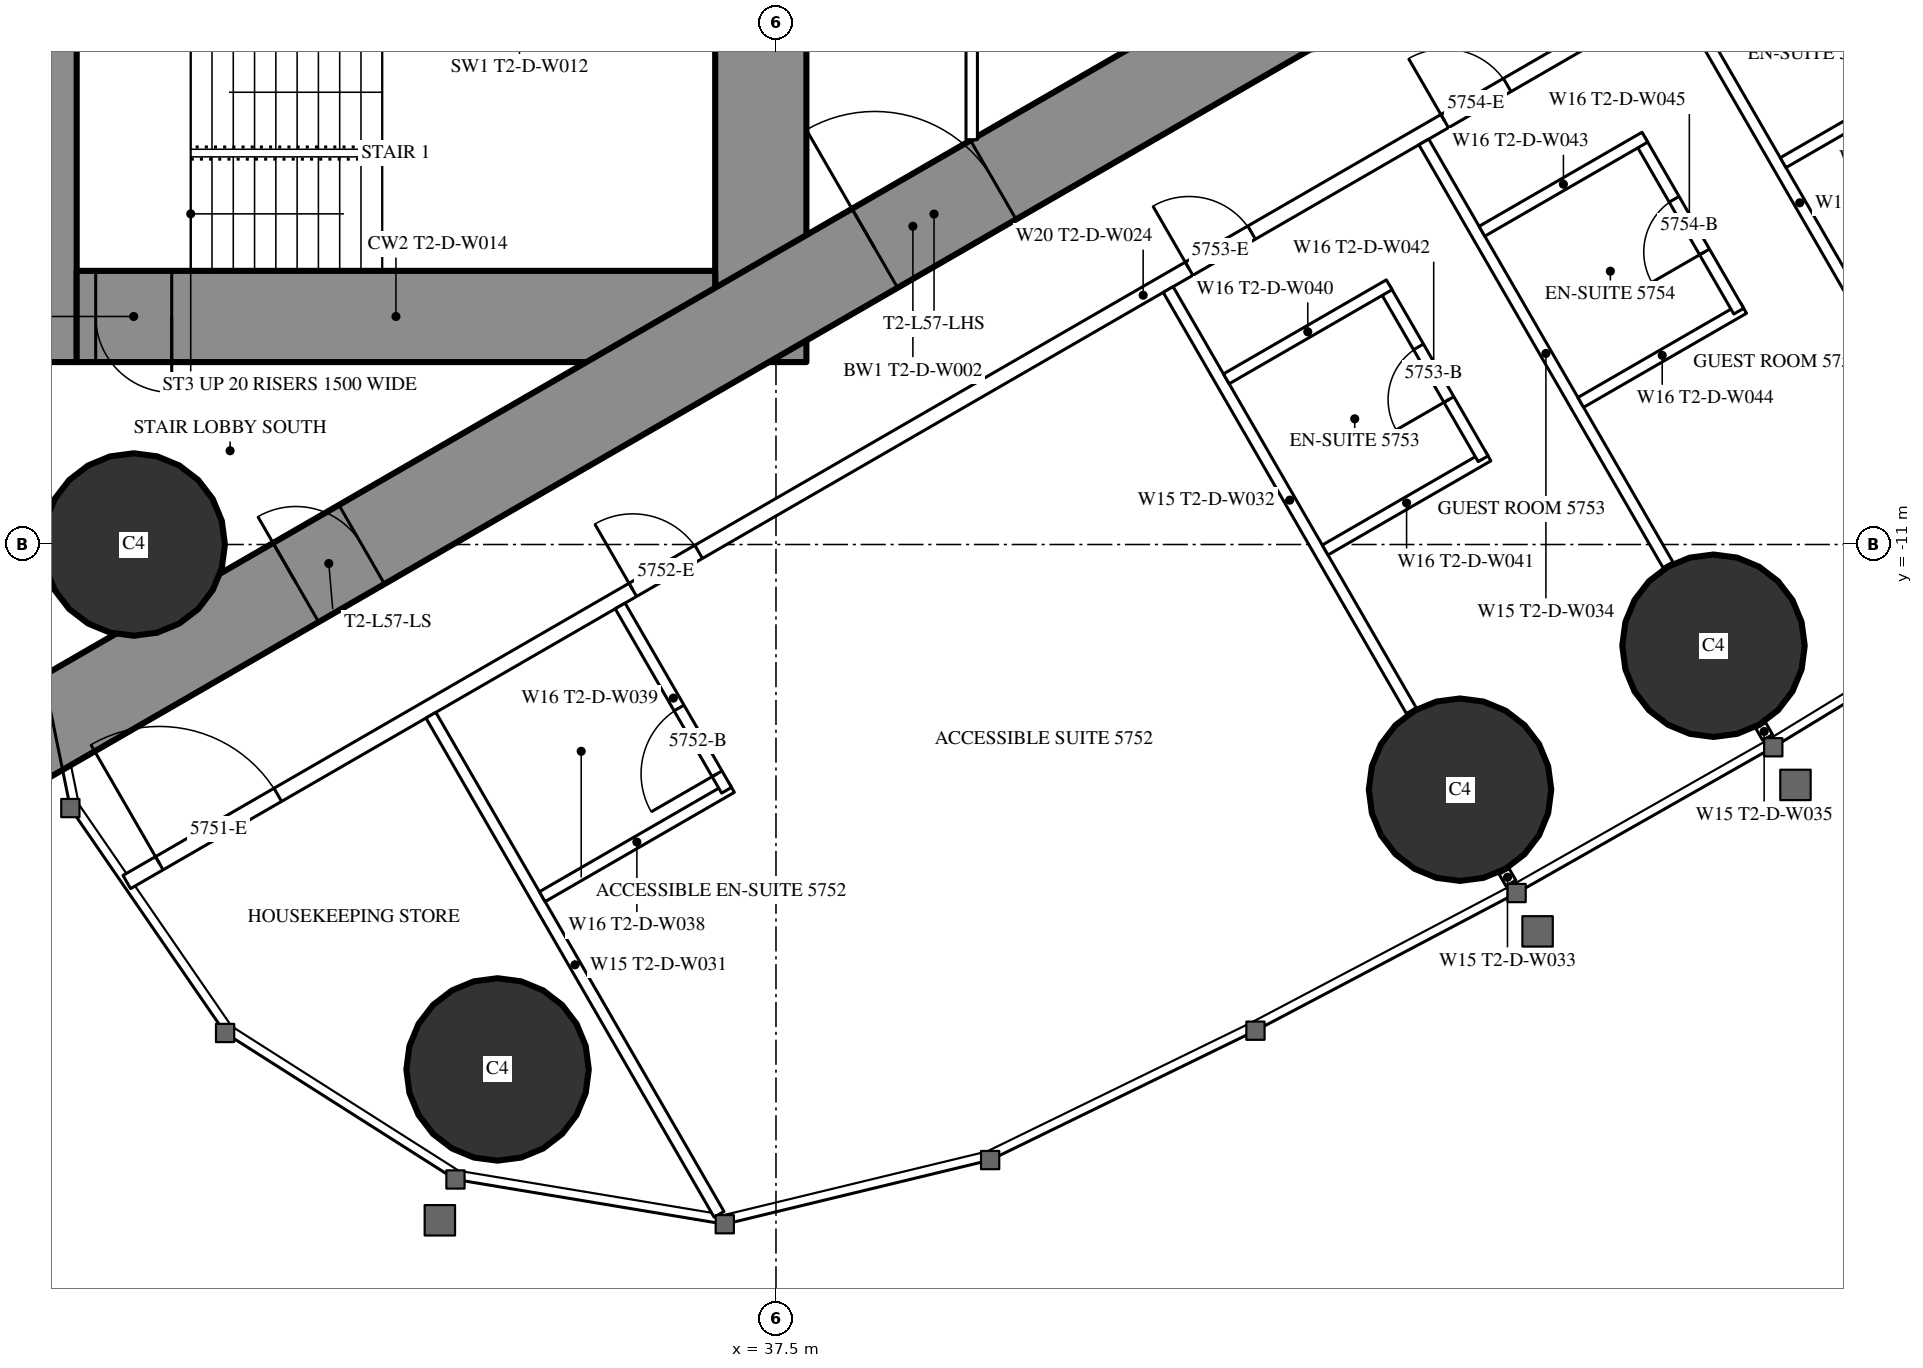
"""IFC4 building model, lengths in metres.
Left out: names, types, materials, properties, quantities, classifications, styles, units other than length and angle.
Written with IfcOpenShell. Run it as: python <this file> out.ifc"""

import sys

from ifc_helpers import new_model, si_unit, direction, frame, frame_2d, origin, origin_2d, place, context, subcontext, project, spatial, rectangle, circle, extrude, element, fill, save


model = new_model("IFC4")
c1 = context("Model", 3, precision=1e-05, world=origin(), true_north=direction((0.0, 1.0)))
c2 = subcontext(c1, "Body", "Model", "MODEL_VIEW")
j1 = project(units=[si_unit("LENGTHUNIT", "METRE"), si_unit("PLANEANGLEUNIT", "RADIAN")], contexts=[c1])
p1 = place(None, origin())
s1 = spatial("IfcSite", under=j1, at=p1, CompositionType="ELEMENT")
p2 = place(p1, origin())
s2 = spatial("IfcBuilding", under=s1, at=p2, CompositionType="ELEMENT")
p3 = place(p2, frame((0.0, 0.0, 215.3)))
s3 = spatial("IfcBuildingStorey", under=s2, at=p3, CompositionType="ELEMENT", Elevation=215.3)
for number, where, z_axis, x_axis in (
    (1, (33.837, -17.906, 0.0), (0.0, 0.0, 1.0), (1.0, 0.0, 0.0)),
    (2, (29.05, -11.0, 0.0), (0.0, 0.0, 1.0), (1.0, 0.0, 0.0)),
    (3, (46.499, -14.226, 0.0), (0.0, 0.0, 1.0), (1.0, 0.0, 0.0)),
    (4, (49.834, -12.332, 0.0), (0.0, 0.0, 1.0), (1.0, 0.0, 0.0)),
):
    element("IfcColumn", number, at=place(p3, frame(where, z_axis=z_axis, x_axis=x_axis)), inside=s3, PredefinedType="COLUMN", context=c2, shape_type="SweptSolid", body=[
        extrude(circle(Radius=1.2, at=origin_2d()), origin(), (0.0, 0.0, 1.0), 3.6),
    ])
p4 = place(p3, frame((27.9, -8.6, 0.0), z_axis=(0.0, 0.0, 1.0), x_axis=(0.0, 1.0, 0.0)))
e5 = element("IfcWall", 5, at=p4, inside=s3, PredefinedType="SHEAR", context=c2, shape_type="SweptSolid", body=[
    extrude(rectangle(XDim=17.2, YDim=0.8, at=frame_2d((8.6, 0.0))), origin(), (0.0, 0.0, 1.0), 3.6),
])
p5 = place(p4, frame((9.35, 0.0, 0.0)))
e6 = element("IfcOpeningElement", 6, at=p5, cuts=e5, PredefinedType="OPENING", context=c2, shape_type="SweptSolid", body=[
    extrude(rectangle(XDim=0.9, YDim=2.2, at=frame_2d((0.45, 1.1))), frame((0.0, 0.41, 0.0), z_axis=(0.0, -1.0, 0.0), x_axis=(1.0, 0.0, 0.0)), (0.0, 0.0, 1.0), 0.82),
])
p6 = place(p3, frame((37.3, -8.6, 0.0), z_axis=(0.0, 0.0, 1.0), x_axis=(0.0, 1.0, 0.0)))
e7 = element("IfcWall", 7, at=p6, inside=s3, PredefinedType="SHEAR", context=c2, shape_type="SweptSolid", body=[
    extrude(rectangle(XDim=17.2, YDim=1.2, at=frame_2d((8.6, 0.0))), origin(), (0.0, 0.0, 1.0), 3.6),
])
p7 = place(p6, frame((7.7, 0.0, 0.0)))
e8 = element("IfcOpeningElement", 8, at=p7, cuts=e7, PredefinedType="OPENING", context=c2, shape_type="SweptSolid", body=[
    extrude(rectangle(XDim=1.8, YDim=2.2, at=frame_2d((0.9, 1.1))), frame((0.0, 0.61, 0.0), z_axis=(0.0, -1.0, 0.0), x_axis=(1.0, 0.0, 0.0)), (0.0, 0.0, 1.0), 1.22),
])
p8 = place(p3, frame((28.3, -8.0, 0.0), z_axis=(0.0, 0.0, 1.0), x_axis=(1.0, 0.0, 0.0)))
e9 = element("IfcWall", 9, at=p8, inside=s3, PredefinedType="SHEAR", context=c2, shape_type="SweptSolid", body=[
    extrude(rectangle(XDim=8.4, YDim=1.2, at=frame_2d((4.2, 0.0))), origin(), (0.0, 0.0, 1.0), 3.6),
])
p9 = place(p8, frame((0.25, 0.0, 0.0)))
e10 = element("IfcOpeningElement", 10, at=p9, cuts=e9, PredefinedType="OPENING", context=c2, shape_type="SweptSolid", body=[
    extrude(rectangle(XDim=1.0, YDim=2.2, at=frame_2d((0.5, 1.1))), frame((0.0, 0.61, 0.0), z_axis=(0.0, -1.0, 0.0), x_axis=(1.0, 0.0, 0.0)), (0.0, 0.0, 1.0), 1.22),
])
p10 = place(p3, frame((27.2, -13.8, 0.0), z_axis=(0.0, 0.0, 1.0), x_axis=(0.866027159892, 0.499996958321, 0.0)))
e11 = element("IfcWall", 11, at=p10, inside=s3, PredefinedType="SHEAR", context=c2, shape_type="SweptSolid", body=[
    extrude(rectangle(XDim=27.947, YDim=1.2, at=frame_2d((13.973, 0.0))), origin(), (0.0, 0.0, 1.0), 3.6),
])
p11 = place(p10, frame((4.6, 0.0, 0.0)))
e12 = element("IfcOpeningElement", 12, at=p11, cuts=e11, PredefinedType="OPENING", context=c2, shape_type="SweptSolid", body=[
    extrude(rectangle(XDim=1.0, YDim=2.2, at=frame_2d((0.5, 1.1))), frame((0.0, 0.61, 0.0), z_axis=(0.0, -1.0, 0.0), x_axis=(1.0, 0.0, 0.0)), (0.0, 0.0, 1.0), 1.22),
])
p12 = place(p10, frame((13.395, 0.0, 0.0)))
e13 = element("IfcOpeningElement", 13, at=p12, cuts=e11, PredefinedType="OPENING", context=c2, shape_type="SweptSolid", body=[
    extrude(rectangle(XDim=1.8, YDim=2.2, at=frame_2d((0.9, 1.1))), frame((0.0, 0.61, 0.0), z_axis=(0.0, -1.0, 0.0), x_axis=(1.0, 0.0, 0.0)), (0.0, 0.0, 1.0), 1.22),
])
p13 = place(p3, frame((28.959, -15.44, 0.0), z_axis=(0.0, 0.0, 1.0), x_axis=(0.866025227435, 0.500000305447, 0.0)))
e14 = element("IfcWall", 14, at=p13, inside=s3, PredefinedType="PARTITIONING", context=c2, shape_type="SweptSolid", body=[
    extrude(rectangle(XDim=30.88, YDim=0.2, at=frame_2d((15.44, 0.0))), origin(), (0.0, 0.0, 1.0), 3.35),
])
p14 = place(p13, frame((0.494, 0.0, 0.0)))
e15 = element("IfcOpeningElement", 15, at=p14, cuts=e14, PredefinedType="OPENING", context=c2, shape_type="SweptSolid", body=[
    extrude(rectangle(XDim=1.8, YDim=2.2, at=frame_2d((0.9, 1.1))), frame((0.0, 0.11, 0.0), z_axis=(0.0, -1.0, 0.0), x_axis=(1.0, 0.0, 0.0)), (0.0, 0.0, 1.0), 0.22),
])
p15 = place(p13, frame((7.687, 0.0, 0.0)))
e16 = element("IfcOpeningElement", 16, at=p15, cuts=e14, PredefinedType="OPENING", context=c2, shape_type="SweptSolid", body=[
    extrude(rectangle(XDim=1.0, YDim=2.2, at=frame_2d((0.5, 1.1))), frame((0.0, 0.11, 0.0), z_axis=(0.0, -1.0, 0.0), x_axis=(1.0, 0.0, 0.0)), (0.0, 0.0, 1.0), 0.22),
])
p16 = place(p13, frame((16.137, 0.0, 0.0)))
e17 = element("IfcOpeningElement", 17, at=p16, cuts=e14, PredefinedType="OPENING", context=c2, shape_type="SweptSolid", body=[
    extrude(rectangle(XDim=0.95, YDim=2.2, at=frame_2d((0.475, 1.1))), frame((0.0, 0.11, 0.0), z_axis=(0.0, -1.0, 0.0), x_axis=(1.0, 0.0, 0.0)), (0.0, 0.0, 1.0), 0.22),
])
p17 = place(p13, frame((20.021, 0.0, 0.0)))
e18 = element("IfcOpeningElement", 18, at=p17, cuts=e14, PredefinedType="OPENING", context=c2, shape_type="SweptSolid", body=[
    extrude(rectangle(XDim=0.95, YDim=2.2, at=frame_2d((0.475, 1.1))), frame((0.0, 0.11, 0.0), z_axis=(0.0, -1.0, 0.0), x_axis=(1.0, 0.0, 0.0)), (0.0, 0.0, 1.0), 0.22),
])
p18 = place(p13, frame((26.253, 0.0, 0.0)))
e19 = element("IfcOpeningElement", 19, at=p18, cuts=e14, PredefinedType="OPENING", context=c2, shape_type="SweptSolid", body=[
    extrude(rectangle(XDim=0.95, YDim=2.2, at=frame_2d((0.475, 1.1))), frame((0.0, 0.11, 0.0), z_axis=(0.0, -1.0, 0.0), x_axis=(1.0, 0.0, 0.0)), (0.0, 0.0, 1.0), 0.22),
])
p19 = place(p3, frame((32.96, -13.246, 0.0), z_axis=(0.0, 0.0, 1.0), x_axis=(0.500000236886, -0.866025267018, 0.0)))
e20 = element("IfcWall", 20, at=p19, inside=s3, PredefinedType="PARTITIONING", context=c2, shape_type="SweptSolid", body=[
    extrude(rectangle(XDim=7.583, YDim=0.15, at=frame_2d((3.791, 0.0))), origin(), (0.0, 0.0, 1.0), 3.35),
])
p20 = place(p3, frame((42.66, -7.646, 0.0), z_axis=(0.0, 0.0, 1.0), x_axis=(0.499996592859, -0.866027370889, 0.0)))
e21 = element("IfcWall", 21, at=p20, inside=s3, PredefinedType="PARTITIONING", context=c2, shape_type="SweptSolid", body=[
    extrude(rectangle(XDim=6.398, YDim=0.15, at=frame_2d((3.199, 0.0))), origin(), (0.0, 0.0, 1.0), 2.45),
])
p21 = place(p3, frame((47.079, -15.3, 0.0), z_axis=(0.0, 0.0, 1.0), x_axis=(0.499212083968, -0.866479829667, 0.0)))
e22 = element("IfcWall", 22, at=p21, inside=s3, PredefinedType="PARTITIONING", context=c2, shape_type="SweptSolid", body=[
    extrude(rectangle(XDim=0.179, YDim=0.15, at=frame_2d((0.09, 0.0))), origin(), (0.0, 0.0, 1.0), 2.45),
])
p22 = place(p3, frame((46.023, -5.704, 0.0), z_axis=(0.0, 0.0, 1.0), x_axis=(0.499984478165, -0.866034365135, 0.0)))
e23 = element("IfcWall", 23, at=p22, inside=s3, PredefinedType="PARTITIONING", context=c2, shape_type="SweptSolid", body=[
    extrude(rectangle(XDim=6.426, YDim=0.15, at=frame_2d((3.213, 0.0))), origin(), (0.0, 0.0, 1.0), 2.45),
])
p23 = place(p3, frame((50.456, -13.382, 0.0), z_axis=(0.0, 0.0, 1.0), x_axis=(0.500661834965, -0.865642955848, 0.0)))
e24 = element("IfcWall", 24, at=p23, inside=s3, PredefinedType="PARTITIONING", context=c2, shape_type="SweptSolid", body=[
    extrude(rectangle(XDim=0.18, YDim=0.15, at=frame_2d((0.09, 0.0))), origin(), (0.0, 0.0, 1.0), 2.45),
])
p24 = place(p3, frame((49.385, -3.763, 0.0), z_axis=(0.0, 0.0, 1.0), x_axis=(0.499999447814, -0.866025722589, 0.0)))
e25 = element("IfcWall", 25, at=p24, inside=s3, PredefinedType="PARTITIONING", context=c2, shape_type="SweptSolid", body=[
    extrude(rectangle(XDim=6.333, YDim=0.15, at=frame_2d((3.166, 0.0))), origin(), (0.0, 0.0, 1.0), 2.45),
])
p25 = place(p3, frame((34.425, -15.633, 0.0), z_axis=(0.0, 0.0, 1.0), x_axis=(0.866018712932, 0.500011588718, 0.0)))
e26 = element("IfcWall", 26, at=p25, inside=s3, PredefinedType="PARTITIONING", context=c2, shape_type="SweptSolid", body=[
    extrude(rectangle(XDim=2.875, YDim=0.15, at=frame_2d((1.438, 0.0))), origin(), (0.0, 0.0, 1.0), 3.35),
])
p26 = place(p3, frame((35.45, -11.808, 0.0), z_axis=(0.0, 0.0, 1.0), x_axis=(0.49994636267, -0.866056369097, 0.0)))
e27 = element("IfcWall", 27, at=p26, inside=s3, PredefinedType="PARTITIONING", context=c2, shape_type="SweptSolid", body=[
    extrude(rectangle(XDim=2.8, YDim=0.15, at=frame_2d((1.4, 0.0))), origin(), (0.0, 0.0, 1.0), 3.35),
])
p27 = place(p26, frame((1.55, 0.0, 0.0)))
e28 = element("IfcOpeningElement", 28, at=p27, cuts=e27, PredefinedType="OPENING", context=c2, shape_type="SweptSolid", body=[
    extrude(rectangle(XDim=1.0, YDim=2.2, at=frame_2d((0.5, 1.1))), frame((0.0, 0.085, 0.0), z_axis=(0.0, -1.0, 0.0), x_axis=(1.0, 0.0, 0.0)), (0.0, 0.0, 1.0), 0.17),
])
p28 = place(p3, frame((44.725, -11.072, 0.0), z_axis=(0.0, 0.0, 1.0), x_axis=(0.866006523861, 0.500032699561, 0.0)))
e29 = element("IfcWall", 29, at=p28, inside=s3, PredefinedType="PARTITIONING", context=c2, shape_type="SweptSolid", body=[
    extrude(rectangle(XDim=2.475, YDim=0.15, at=frame_2d((1.237, 0.0))), origin(), (0.0, 0.0, 1.0), 3.35),
])
p29 = place(p3, frame((45.503, -7.621, 0.0), z_axis=(0.0, 0.0, 1.0), x_axis=(0.500006934395, -0.866021400173, 0.0)))
e30 = element("IfcWall", 30, at=p29, inside=s3, PredefinedType="PARTITIONING", context=c2, shape_type="SweptSolid", body=[
    extrude(rectangle(XDim=2.6, YDim=0.15, at=frame_2d((1.3, 0.0))), origin(), (0.0, 0.0, 1.0), 3.35),
])
p30 = place(p29, frame((0.9, 0.0, 0.0)))
e31 = element("IfcOpeningElement", 31, at=p30, cuts=e30, PredefinedType="OPENING", context=c2, shape_type="SweptSolid", body=[
    extrude(rectangle(XDim=0.8, YDim=2.2, at=frame_2d((0.4, 1.1))), frame((0.0, 0.085, 0.0), z_axis=(0.0, -1.0, 0.0), x_axis=(1.0, 0.0, 0.0)), (0.0, 0.0, 1.0), 0.17),
])
for number, where, z_axis, x_axis in (
    (32, (43.425, -8.821, 0.0), (0.0, 0.0, 1.0), (0.866, 0.5, 0.0)),
    (33, (48.088, -9.13, 0.0), (0.0, 0.0, 1.0), (0.866, 0.5, 0.0)),
):
    element("IfcWall", number, at=place(p3, frame(where, z_axis=z_axis, x_axis=x_axis)), inside=s3, PredefinedType="PARTITIONING", context=c2, shape_type="SweptSolid", body=[
        extrude(rectangle(XDim=2.475, YDim=0.15, at=frame_2d((1.237, 0.0))), origin(), (0.0, 0.0, 1.0), 3.35),
    ])
p31 = place(p3, frame((48.866, -5.679, 0.0), z_axis=(0.0, 0.0, 1.0), x_axis=(0.500006934395, -0.866021400173, 0.0)))
e34 = element("IfcWall", 34, at=p31, inside=s3, PredefinedType="PARTITIONING", context=c2, shape_type="SweptSolid", body=[
    extrude(rectangle(XDim=2.6, YDim=0.15, at=frame_2d((1.3, 0.0))), origin(), (0.0, 0.0, 1.0), 3.35),
])
p32 = place(p31, frame((0.9, 0.0, 0.0)))
e35 = element("IfcOpeningElement", 35, at=p32, cuts=e34, PredefinedType="OPENING", context=c2, shape_type="SweptSolid", body=[
    extrude(rectangle(XDim=0.8, YDim=2.2, at=frame_2d((0.4, 1.1))), frame((0.0, 0.085, 0.0), z_axis=(0.0, -1.0, 0.0), x_axis=(1.0, 0.0, 0.0)), (0.0, 0.0, 1.0), 0.17),
])
p33 = place(p3, frame((46.788, -6.879, 0.0), z_axis=(0.0, 0.0, 1.0), x_axis=(0.866006523861, 0.500032699561, 0.0)))
e36 = element("IfcWall", 36, at=p33, inside=s3, PredefinedType="PARTITIONING", context=c2, shape_type="SweptSolid", body=[
    extrude(rectangle(XDim=2.475, YDim=0.15, at=frame_2d((1.237, 0.0))), origin(), (0.0, 0.0, 1.0), 3.35),
])
p34 = place(p3, frame((50.75, -5.977, 0.0), z_axis=(0.0, 0.0, 1.0), x_axis=(0.866031185235, 0.4999899861, 0.0)))
e37 = element("IfcWall", 37, at=p34, inside=s3, PredefinedType="PARTITIONING", context=c2, shape_type="SweptSolid", body=[
    extrude(rectangle(XDim=2.475, YDim=0.15, at=frame_2d((1.238, 0.0))), origin(), (0.0, 0.0, 1.0), 3.35),
])
p35 = place(p3, frame((51.529, -2.525, 0.0), z_axis=(0.0, 0.0, 1.0), x_axis=(0.500006934395, -0.866021400173, 0.0)))
e38 = element("IfcWall", 38, at=p35, inside=s3, PredefinedType="PARTITIONING", context=c2, shape_type="SweptSolid", body=[
    extrude(rectangle(XDim=2.6, YDim=0.15, at=frame_2d((1.3, 0.0))), origin(), (0.0, 0.0, 1.0), 3.35),
])
p36 = place(p35, frame((0.9, 0.0, 0.0)))
e39 = element("IfcOpeningElement", 39, at=p36, cuts=e38, PredefinedType="OPENING", context=c2, shape_type="SweptSolid", body=[
    extrude(rectangle(XDim=0.8, YDim=2.2, at=frame_2d((0.4, 1.1))), frame((0.0, 0.085, 0.0), z_axis=(0.0, -1.0, 0.0), x_axis=(1.0, 0.0, 0.0)), (0.0, 0.0, 1.0), 0.17),
])
p37 = place(p3, frame((40.075, -5.674, 0.0), z_axis=(0.0, 0.0, 1.0), x_axis=(0.0, 1.0, 0.0)))
e40 = element("IfcWall", 40, at=p37, inside=s3, PredefinedType="PARTITIONING", context=c2, shape_type="SweptSolid", body=[
    extrude(rectangle(XDim=11.348, YDim=0.15, at=frame_2d((5.674, 0.0))), origin(), (0.0, 0.0, 1.0), 3.35),
])
p38 = place(p37, frame((4.774, 0.0, 0.0)))
e41 = element("IfcOpeningElement", 41, at=p38, cuts=e40, PredefinedType="OPENING", context=c2, shape_type="SweptSolid", body=[
    extrude(rectangle(XDim=1.8, YDim=2.2, at=frame_2d((0.9, 1.1))), frame((0.0, 0.085, 0.0), z_axis=(0.0, -1.0, 0.0), x_axis=(1.0, 0.0, 0.0)), (0.0, 0.0, 1.0), 0.17),
])
p39 = place(p14, origin())
e42 = element("IfcDoor", 42, at=p39, inside=s3, OperationType="DOUBLE_DOOR_SINGLE_SWING", PredefinedType="DOOR", context=c2, shape_type="SweptSolid", body=[
    extrude(rectangle(XDim=1.8, YDim=2.2, at=frame_2d((0.9, 1.1))), frame((0.0, 0.025, 0.0), z_axis=(0.0, -1.0, 0.0), x_axis=(1.0, 0.0, 0.0)), (0.0, 0.0, 1.0), 0.05),
])
fill(e15, e42)
p40 = place(p27, origin())
e43 = element("IfcDoor", 43, at=p40, inside=s3, OperationType="SINGLE_SWING_RIGHT", PredefinedType="DOOR", context=c2, shape_type="SweptSolid", body=[
    extrude(rectangle(XDim=1.0, YDim=2.2, at=frame_2d((0.5, 1.1))), frame((0.0, 0.025, 0.0), z_axis=(0.0, -1.0, 0.0), x_axis=(1.0, 0.0, 0.0)), (0.0, 0.0, 1.0), 0.05),
])
fill(e28, e43)
p41 = place(p15, origin())
e44 = element("IfcDoor", 44, at=p41, inside=s3, OperationType="SINGLE_SWING_LEFT", PredefinedType="DOOR", context=c2, shape_type="SweptSolid", body=[
    extrude(rectangle(XDim=1.0, YDim=2.2, at=frame_2d((0.5, 1.1))), frame((0.0, 0.025, 0.0), z_axis=(0.0, -1.0, 0.0), x_axis=(1.0, 0.0, 0.0)), (0.0, 0.0, 1.0), 0.05),
])
fill(e16, e44)
p42 = place(p30, origin())
e45 = element("IfcDoor", 45, at=p42, inside=s3, OperationType="SINGLE_SWING_RIGHT", PredefinedType="DOOR", context=c2, shape_type="SweptSolid", body=[
    extrude(rectangle(XDim=0.8, YDim=2.2, at=frame_2d((0.4, 1.1))), frame((0.0, 0.025, 0.0), z_axis=(0.0, -1.0, 0.0), x_axis=(1.0, 0.0, 0.0)), (0.0, 0.0, 1.0), 0.05),
])
fill(e31, e45)
p43 = place(p16, origin())
e46 = element("IfcDoor", 46, at=p43, inside=s3, OperationType="SINGLE_SWING_LEFT", PredefinedType="DOOR", context=c2, shape_type="SweptSolid", body=[
    extrude(rectangle(XDim=0.95, YDim=2.2, at=frame_2d((0.475, 1.1))), frame((0.0, 0.025, 0.0), z_axis=(0.0, -1.0, 0.0), x_axis=(1.0, 0.0, 0.0)), (0.0, 0.0, 1.0), 0.05),
])
fill(e17, e46)
p44 = place(p32, origin())
e47 = element("IfcDoor", 47, at=p44, inside=s3, OperationType="SINGLE_SWING_RIGHT", PredefinedType="DOOR", context=c2, shape_type="SweptSolid", body=[
    extrude(rectangle(XDim=0.8, YDim=2.2, at=frame_2d((0.4, 1.1))), frame((0.0, 0.025, 0.0), z_axis=(0.0, -1.0, 0.0), x_axis=(1.0, 0.0, 0.0)), (0.0, 0.0, 1.0), 0.05),
])
fill(e35, e47)
p45 = place(p17, origin())
e48 = element("IfcDoor", 48, at=p45, inside=s3, OperationType="SINGLE_SWING_LEFT", PredefinedType="DOOR", context=c2, shape_type="SweptSolid", body=[
    extrude(rectangle(XDim=0.95, YDim=2.2, at=frame_2d((0.475, 1.1))), frame((0.0, 0.025, 0.0), z_axis=(0.0, -1.0, 0.0), x_axis=(1.0, 0.0, 0.0)), (0.0, 0.0, 1.0), 0.05),
])
fill(e18, e48)
p46 = place(p11, origin())
e49 = element("IfcDoor", 49, at=p46, inside=s3, OperationType="SINGLE_SWING_LEFT", PredefinedType="DOOR", context=c2, shape_type="SweptSolid", body=[
    extrude(rectangle(XDim=1.0, YDim=2.2, at=frame_2d((0.5, 1.1))), frame((0.0, 0.025, 0.0), z_axis=(0.0, -1.0, 0.0), x_axis=(1.0, 0.0, 0.0)), (0.0, 0.0, 1.0), 0.05),
])
fill(e12, e49)
p47 = place(p12, origin())
e50 = element("IfcDoor", 50, at=p47, inside=s3, OperationType="DOUBLE_DOOR_SINGLE_SWING", PredefinedType="DOOR", context=c2, shape_type="SweptSolid", body=[
    extrude(rectangle(XDim=1.8, YDim=2.2, at=frame_2d((0.9, 1.1))), frame((0.0, 0.025, 0.0), z_axis=(0.0, -1.0, 0.0), x_axis=(1.0, 0.0, 0.0)), (0.0, 0.0, 1.0), 0.05),
])
fill(e13, e50)
p48 = place(p9, origin())
e51 = element("IfcDoor", 51, at=p48, inside=s3, OperationType="SINGLE_SWING_RIGHT", PredefinedType="DOOR", context=c2, shape_type="SweptSolid", body=[
    extrude(rectangle(XDim=1.0, YDim=2.2, at=frame_2d((0.5, 1.1))), frame((0.0, 0.025, 0.0), z_axis=(0.0, -1.0, 0.0), x_axis=(1.0, 0.0, 0.0)), (0.0, 0.0, 1.0), 0.05),
])
fill(e10, e51)
save(model, sys.argv[1])
